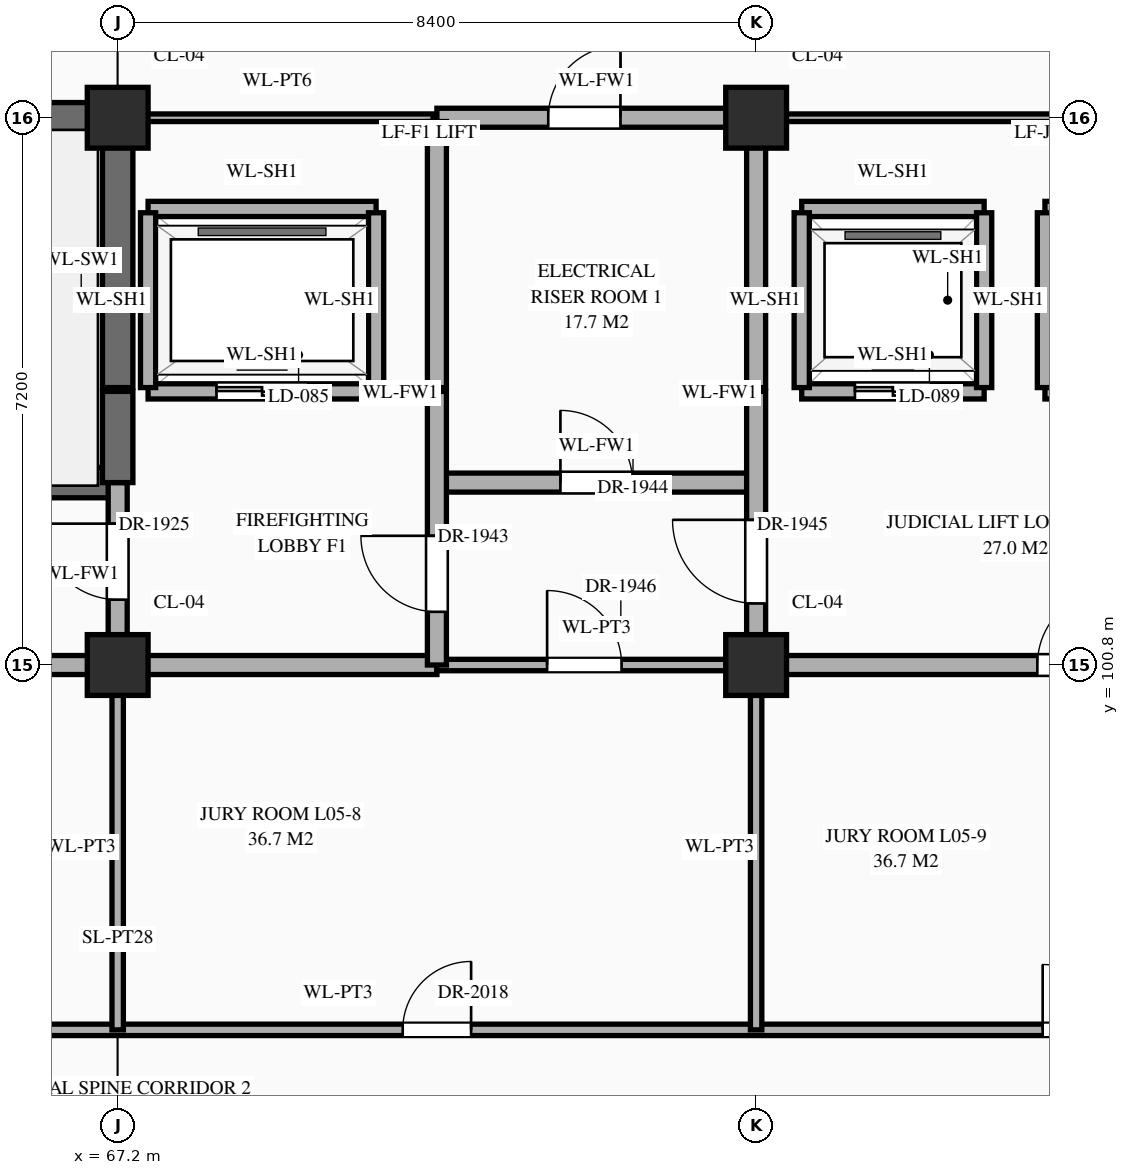
"""IFC4 building model, lengths in metres.
Left out: names, types, materials, properties, quantities, classifications, styles, units other than length and angle.
Written with IfcOpenShell. Run it as: python <this file> out.ifc"""

import sys

from ifc_helpers import new_model, si_unit, direction, frame, frame_2d, origin, origin_2d, place, context, subcontext, project, spatial, rectangle, extrude, element, fill, save


model = new_model("IFC4")
c1 = context("Model", 3, precision=1e-05, world=origin(), true_north=direction((0.0, 1.0)))
c2 = subcontext(c1, "Body", "Model", "MODEL_VIEW")
j1 = project(units=[si_unit("LENGTHUNIT", "METRE"), si_unit("PLANEANGLEUNIT", "RADIAN")], contexts=[c1])
p1 = place(None, origin())
s1 = spatial("IfcSite", under=j1, at=p1, CompositionType="ELEMENT")
p2 = place(p1, origin())
s2 = spatial("IfcBuilding", under=s1, at=p2, CompositionType="ELEMENT")
p3 = place(p2, frame((0.0, 0.0, 21.6)))
s3 = spatial("IfcBuildingStorey", under=s2, at=p3, CompositionType="ELEMENT", Elevation=21.6)
for number, where, z_axis, x_axis in (
    (1, (67.2, 100.8, 0.0), (0.0, 0.0, 1.0), (1.0, 0.0, 0.0)),
    (2, (67.2, 108.0, 0.0), (0.0, 0.0, 1.0), (1.0, 0.0, 0.0)),
    (3, (75.6, 100.8, 0.0), (0.0, 0.0, 1.0), (1.0, 0.0, 0.0)),
    (4, (75.6, 108.0, 0.0), (0.0, 0.0, 1.0), (1.0, 0.0, 0.0)),
):
    element("IfcColumn", number, at=place(p3, frame(where, z_axis=z_axis, x_axis=x_axis)), inside=s3, PredefinedType="COLUMN", context=c2, shape_type="SweptSolid", body=[
        extrude(rectangle(XDim=0.8, YDim=0.8, at=origin_2d()), origin(), (0.0, 0.0, 1.0), 4.5),
    ])
p4 = place(p3, frame((56.2, 96.0, 0.0), z_axis=(0.0, 0.0, 1.0), x_axis=(1.0, 0.0, 0.0)))
e5 = element("IfcWall", 5, at=p4, inside=s3, PredefinedType="STANDARD", context=c2, shape_type="SweptSolid", body=[
    extrude(rectangle(XDim=27.8, YDim=0.15, at=frame_2d((13.9, 0.0))), origin(), (0.0, 0.0, 1.0), 4.24),
])
p5 = place(p4, frame((0.77, 0.0, 0.0)))
e6 = element("IfcOpeningElement", 6, at=p5, cuts=e5, PredefinedType="OPENING", context=c2, shape_type="SweptSolid", body=[
    extrude(rectangle(XDim=1.06, YDim=2.4, at=frame_2d((0.53, 1.2))), frame((0.0, 0.087, 0.0), z_axis=(0.0, -1.0, 0.0), x_axis=(1.0, 0.0, 0.0)), (0.0, 0.0, 1.0), 0.174),
])
p6 = place(p4, frame((6.23, 0.0, 0.0)))
e7 = element("IfcOpeningElement", 7, at=p6, cuts=e5, PredefinedType="OPENING", context=c2, shape_type="SweptSolid", body=[
    extrude(rectangle(XDim=1.14, YDim=2.4, at=frame_2d((0.57, 1.2))), frame((0.0, 0.087, 0.0), z_axis=(0.0, -1.0, 0.0), x_axis=(1.0, 0.0, 0.0)), (0.0, 0.0, 1.0), 0.174),
])
p7 = place(p4, frame((14.75, 0.0, 0.0)))
e8 = element("IfcOpeningElement", 8, at=p7, cuts=e5, PredefinedType="OPENING", context=c2, shape_type="SweptSolid", body=[
    extrude(rectangle(XDim=0.9, YDim=2.15, at=frame_2d((0.45, 1.075))), frame((0.0, 0.087, 0.0), z_axis=(0.0, -1.0, 0.0), x_axis=(1.0, 0.0, 0.0)), (0.0, 0.0, 1.0), 0.174),
])
p8 = place(p4, frame((23.17, 0.0, 0.0)))
e9 = element("IfcOpeningElement", 9, at=p8, cuts=e5, PredefinedType="OPENING", context=c2, shape_type="SweptSolid", body=[
    extrude(rectangle(XDim=0.86, YDim=2.1, at=frame_2d((0.43, 1.05))), frame((0.0, 0.087, 0.0), z_axis=(0.0, -1.0, 0.0), x_axis=(1.0, 0.0, 0.0)), (0.0, 0.0, 1.0), 0.174),
])
p9 = place(p3, frame((58.8, 100.8, 0.0), z_axis=(0.0, 0.0, 1.0), x_axis=(1.0, 0.0, 0.0)))
e10 = element("IfcWall", 10, at=p9, inside=s3, PredefinedType="STANDARD", context=c2, shape_type="SweptSolid", body=[
    extrude(rectangle(XDim=12.6, YDim=0.25, at=frame_2d((6.3, 0.0))), origin(), (0.0, 0.0, 1.0), 3.39),
])
p10 = place(p9, frame((3.65, 0.0, 0.0)))
e11 = element("IfcOpeningElement", 11, at=p10, cuts=e10, PredefinedType="OPENING", context=c2, shape_type="SweptSolid", body=[
    extrude(rectangle(XDim=1.1, YDim=2.2, at=frame_2d((0.55, 1.1))), frame((0.0, 0.137, 0.0), z_axis=(0.0, -1.0, 0.0), x_axis=(1.0, 0.0, 0.0)), (0.0, 0.0, 1.0), 0.274),
])
p11 = place(p3, frame((71.4, 100.8, 0.0), z_axis=(0.0, 0.0, 1.0), x_axis=(1.0, 0.0, 0.0)))
e12 = element("IfcWall", 12, at=p11, inside=s3, PredefinedType="STANDARD", context=c2, shape_type="SweptSolid", body=[
    extrude(rectangle(XDim=4.2, YDim=0.15, at=frame_2d((2.1, 0.0))), origin(), (0.0, 0.0, 1.0), 3.39),
])
p12 = place(p11, frame((1.45, 0.0, 0.0)))
e13 = element("IfcOpeningElement", 13, at=p12, cuts=e12, PredefinedType="OPENING", context=c2, shape_type="SweptSolid", body=[
    extrude(rectangle(XDim=0.98, YDim=2.35, at=frame_2d((0.49, 1.175))), frame((0.0, 0.087, 0.0), z_axis=(0.0, -1.0, 0.0), x_axis=(1.0, 0.0, 0.0)), (0.0, 0.0, 1.0), 0.174),
])
p13 = place(p3, frame((75.6, 100.8, 0.0), z_axis=(0.0, 0.0, 1.0), x_axis=(1.0, 0.0, 0.0)))
e14 = element("IfcWall", 14, at=p13, inside=s3, PredefinedType="STANDARD", context=c2, shape_type="SweptSolid", body=[
    extrude(rectangle(XDim=16.8, YDim=0.25, at=frame_2d((8.4, 0.0))), origin(), (0.0, 0.0, 1.0), 3.39),
])
p14 = place(p13, frame((3.7, 0.0, 0.0)))
e15 = element("IfcOpeningElement", 15, at=p14, cuts=e14, PredefinedType="OPENING", context=c2, shape_type="SweptSolid", body=[
    extrude(rectangle(XDim=1.0, YDim=2.2, at=frame_2d((0.5, 1.1))), frame((0.0, 0.137, 0.0), z_axis=(0.0, -1.0, 0.0), x_axis=(1.0, 0.0, 0.0)), (0.0, 0.0, 1.0), 0.274),
])
p15 = place(p13, frame((9.71, 0.0, 0.0)))
e16 = element("IfcOpeningElement", 16, at=p15, cuts=e14, PredefinedType="OPENING", context=c2, shape_type="SweptSolid", body=[
    extrude(rectangle(XDim=1.1, YDim=2.2, at=frame_2d((0.55, 1.1))), frame((0.0, 0.137, 0.0), z_axis=(0.0, -1.0, 0.0), x_axis=(1.0, 0.0, 0.0)), (0.0, 0.0, 1.0), 0.274),
])
p16 = place(p13, frame((12.5, 0.0, 0.0)))
e17 = element("IfcOpeningElement", 17, at=p16, cuts=e14, PredefinedType="OPENING", context=c2, shape_type="SweptSolid", body=[
    extrude(rectangle(XDim=1.0, YDim=2.2, at=frame_2d((0.5, 1.1))), frame((0.0, 0.137, 0.0), z_axis=(0.0, -1.0, 0.0), x_axis=(1.0, 0.0, 0.0)), (0.0, 0.0, 1.0), 0.274),
])
p17 = place(p13, frame((14.865, 0.0, 0.0)))
e18 = element("IfcOpeningElement", 18, at=p17, cuts=e14, PredefinedType="OPENING", context=c2, shape_type="SweptSolid", body=[
    extrude(rectangle(XDim=0.95, YDim=2.15, at=frame_2d((0.475, 1.075))), frame((0.0, 0.137, 0.0), z_axis=(0.0, -1.0, 0.0), x_axis=(1.0, 0.0, 0.0)), (0.0, 0.0, 1.0), 0.274),
])
p18 = place(p3, frame((58.8, 103.2, 0.0), z_axis=(0.0, 0.0, 1.0), x_axis=(1.0, 0.0, 0.0)))
e19 = element("IfcWall", 19, at=p18, inside=s3, PredefinedType="SHEAR", context=c2, shape_type="SweptSolid", body=[
    extrude(rectangle(XDim=8.4, YDim=0.4, at=frame_2d((4.2, 0.0))), origin(), (0.0, 0.0, 1.0), 4.24),
])
p19 = place(p18, frame((0.65, 0.0, 0.0)))
e20 = element("IfcOpeningElement", 20, at=p19, cuts=e19, PredefinedType="OPENING", context=c2, shape_type="SweptSolid", body=[
    extrude(rectangle(XDim=1.1, YDim=2.2, at=frame_2d((0.55, 1.1))), frame((0.0, 0.212, 0.0), z_axis=(0.0, -1.0, 0.0), x_axis=(1.0, 0.0, 0.0)), (0.0, 0.0, 1.0), 0.424),
])
p20 = place(p3, frame((71.4, 103.2, 0.0), z_axis=(0.0, 0.0, 1.0), x_axis=(1.0, 0.0, 0.0)))
e21 = element("IfcWall", 21, at=p20, inside=s3, PredefinedType="STANDARD", context=c2, shape_type="SweptSolid", body=[
    extrude(rectangle(XDim=4.2, YDim=0.25, at=frame_2d((2.1, 0.0))), origin(), (0.0, 0.0, 1.0), 4.24),
])
p21 = place(p20, frame((1.625, 0.0, 0.0)))
e22 = element("IfcOpeningElement", 22, at=p21, cuts=e21, PredefinedType="OPENING", context=c2, shape_type="SweptSolid", body=[
    extrude(rectangle(XDim=0.95, YDim=2.15, at=frame_2d((0.475, 1.075))), frame((0.0, 0.137, 0.0), z_axis=(0.0, -1.0, 0.0), x_axis=(1.0, 0.0, 0.0)), (0.0, 0.0, 1.0), 0.274),
])
p22 = place(p3, frame((67.6, 104.4, 0.0), z_axis=(0.0, 0.0, 1.0), x_axis=(1.0, 0.0, 0.0)))
e23 = element("IfcWall", 23, at=p22, inside=s3, PredefinedType="STANDARD", context=c2, shape_type="SweptSolid", body=[
    extrude(rectangle(XDim=3.0, YDim=0.2, at=frame_2d((1.5, 0.0))), origin(), (0.0, 0.0, 1.0), 4.24),
])
p23 = place(p22, frame((0.9, 0.0, 0.0)))
e24 = element("IfcOpeningElement", 24, at=p23, cuts=e23, PredefinedType="OPENING", context=c2, shape_type="SweptSolid", body=[
    extrude(rectangle(XDim=1.2, YDim=2.15, at=frame_2d((0.6, 1.075))), frame((0.0, 0.112, 0.0), z_axis=(0.0, -1.0, 0.0), x_axis=(1.0, 0.0, 0.0)), (0.0, 0.0, 1.0), 0.224),
])
p24 = place(p3, frame((76.2, 104.4, 0.0), z_axis=(0.0, 0.0, 1.0), x_axis=(1.0, 0.0, 0.0)))
e25 = element("IfcWall", 25, at=p24, inside=s3, PredefinedType="STANDARD", context=c2, shape_type="SweptSolid", body=[
    extrude(rectangle(XDim=2.4, YDim=0.2, at=frame_2d((1.2, 0.0))), origin(), (0.0, 0.0, 1.0), 4.24),
])
p25 = place(p24, frame((0.7, 0.0, 0.0)))
e26 = element("IfcOpeningElement", 26, at=p25, cuts=e25, PredefinedType="OPENING", context=c2, shape_type="SweptSolid", body=[
    extrude(rectangle(XDim=1.0, YDim=2.15, at=frame_2d((0.5, 1.075))), frame((0.0, 0.112, 0.0), z_axis=(0.0, -1.0, 0.0), x_axis=(1.0, 0.0, 0.0)), (0.0, 0.0, 1.0), 0.224),
])
p26 = place(p3, frame((79.4, 104.4, 0.0), z_axis=(0.0, 0.0, 1.0), x_axis=(1.0, 0.0, 0.0)))
e27 = element("IfcWall", 27, at=p26, inside=s3, PredefinedType="STANDARD", context=c2, shape_type="SweptSolid", body=[
    extrude(rectangle(XDim=2.4, YDim=0.2, at=frame_2d((1.2, 0.0))), origin(), (0.0, 0.0, 1.0), 4.24),
])
p27 = place(p26, frame((0.7, 0.0, 0.0)))
e28 = element("IfcOpeningElement", 28, at=p27, cuts=e27, PredefinedType="OPENING", context=c2, shape_type="SweptSolid", body=[
    extrude(rectangle(XDim=1.0, YDim=2.15, at=frame_2d((0.5, 1.075))), frame((0.0, 0.112, 0.0), z_axis=(0.0, -1.0, 0.0), x_axis=(1.0, 0.0, 0.0)), (0.0, 0.0, 1.0), 0.224),
])
p28 = place(p3, frame((67.6, 106.8, 0.0), z_axis=(0.0, 0.0, 1.0), x_axis=(1.0, 0.0, 0.0)))
e29 = element("IfcWall", 29, at=p28, inside=s3, PredefinedType="STANDARD", context=c2, shape_type="SweptSolid", body=[
    extrude(rectangle(XDim=3.0, YDim=0.2, at=frame_2d((1.5, 0.0))), origin(), (0.0, 0.0, 1.0), 4.24),
])
for number, where, z_axis, x_axis in (
    (30, (76.2, 106.8, 0.0), (0.0, 0.0, 1.0), (1.0, 0.0, 0.0)),
    (31, (79.4, 106.8, 0.0), (0.0, 0.0, 1.0), (1.0, 0.0, 0.0)),
):
    element("IfcWall", number, at=place(p3, frame(where, z_axis=z_axis, x_axis=x_axis)), inside=s3, PredefinedType="STANDARD", context=c2, shape_type="SweptSolid", body=[
        extrude(rectangle(XDim=2.4, YDim=0.2, at=frame_2d((1.2, 0.0))), origin(), (0.0, 0.0, 1.0), 4.24),
    ])
p29 = place(p3, frame((58.8, 108.0, 0.0), z_axis=(0.0, 0.0, 1.0), x_axis=(1.0, 0.0, 0.0)))
e32 = element("IfcWall", 32, at=p29, inside=s3, PredefinedType="SHEAR", context=c2, shape_type="SweptSolid", body=[
    extrude(rectangle(XDim=8.4, YDim=0.4, at=frame_2d((4.2, 0.0))), origin(), (0.0, 0.0, 1.0), 4.24),
])
p30 = place(p3, frame((67.25, 108.0, 0.0), z_axis=(0.0, 0.0, 1.0), x_axis=(1.0, 0.0, 0.0)))
e33 = element("IfcWall", 33, at=p30, inside=s3, PredefinedType="STANDARD", context=c2, shape_type="SweptSolid", body=[
    extrude(rectangle(XDim=4.1, YDim=0.1, at=frame_2d((2.05, 0.0))), origin(), (0.0, 0.0, 1.0), 3.39),
])
p31 = place(p3, frame((71.4, 108.0, 0.0), z_axis=(0.0, 0.0, 1.0), x_axis=(1.0, 0.0, 0.0)))
e34 = element("IfcWall", 34, at=p31, inside=s3, PredefinedType="STANDARD", context=c2, shape_type="SweptSolid", body=[
    extrude(rectangle(XDim=4.2, YDim=0.25, at=frame_2d((2.1, 0.0))), origin(), (0.0, 0.0, 1.0), 3.39),
])
p32 = place(p31, frame((1.465, 0.0, 0.0)))
e35 = element("IfcOpeningElement", 35, at=p32, cuts=e34, PredefinedType="OPENING", context=c2, shape_type="SweptSolid", body=[
    extrude(rectangle(XDim=0.95, YDim=2.15, at=frame_2d((0.475, 1.075))), frame((0.0, 0.137, 0.0), z_axis=(0.0, -1.0, 0.0), x_axis=(1.0, 0.0, 0.0)), (0.0, 0.0, 1.0), 0.274),
])
p33 = place(p3, frame((75.65, 108.0, 0.0), z_axis=(0.0, 0.0, 1.0), x_axis=(1.0, 0.0, 0.0)))
e36 = element("IfcWall", 36, at=p33, inside=s3, PredefinedType="STANDARD", context=c2, shape_type="SweptSolid", body=[
    extrude(rectangle(XDim=6.15, YDim=0.1, at=frame_2d((3.075, 0.0))), origin(), (0.0, 0.0, 1.0), 3.39),
])
p34 = place(p3, frame((67.2, 96.0, 0.0), z_axis=(0.0, 0.0, 1.0), x_axis=(0.0, 1.0, 0.0)))
e37 = element("IfcWall", 37, at=p34, inside=s3, PredefinedType="STANDARD", context=c2, shape_type="SweptSolid", body=[
    extrude(rectangle(XDim=4.8, YDim=0.15, at=frame_2d((2.4, 0.0))), origin(), (0.0, 0.0, 1.0), 3.49),
])
p35 = place(p3, frame((67.2, 100.8, 0.0), z_axis=(0.0, 0.0, 1.0), x_axis=(0.0, 1.0, 0.0)))
e38 = element("IfcWall", 38, at=p35, inside=s3, PredefinedType="STANDARD", context=c2, shape_type="SweptSolid", body=[
    extrude(rectangle(XDim=2.4, YDim=0.25, at=frame_2d((1.2, 0.0))), origin(), (0.0, 0.0, 1.0), 3.49),
])
p36 = place(p35, frame((0.86, 0.0, 0.0)))
e39 = element("IfcOpeningElement", 39, at=p36, cuts=e38, PredefinedType="OPENING", context=c2, shape_type="SweptSolid", body=[
    extrude(rectangle(XDim=1.0, YDim=2.2, at=frame_2d((0.5, 1.1))), frame((0.0, 0.137, 0.0), z_axis=(0.0, -1.0, 0.0), x_axis=(1.0, 0.0, 0.0)), (0.0, 0.0, 1.0), 0.274),
])
p37 = place(p3, frame((67.2, 103.2, 0.0), z_axis=(0.0, 0.0, 1.0), x_axis=(0.0, 1.0, 0.0)))
e40 = element("IfcWall", 40, at=p37, inside=s3, PredefinedType="SHEAR", context=c2, shape_type="SweptSolid", body=[
    extrude(rectangle(XDim=1.2, YDim=0.4, at=frame_2d((0.6, 0.0))), origin(), (0.0, 0.0, 1.0), 4.24),
])
p38 = place(p3, frame((67.2, 104.45, 0.0), z_axis=(0.0, 0.0, 1.0), x_axis=(0.0, 1.0, 0.0)))
e41 = element("IfcWall", 41, at=p38, inside=s3, PredefinedType="SHEAR", context=c2, shape_type="SweptSolid", body=[
    extrude(rectangle(XDim=3.5, YDim=0.4, at=frame_2d((1.75, 0.0))), origin(), (0.0, 0.0, 1.0), 4.24),
])
for number, where, z_axis, x_axis in (
    (42, (67.6, 104.45, 0.0), (0.0, 0.0, 1.0), (0.0, 1.0, 0.0)),
    (43, (70.6, 104.45, 0.0), (0.0, 0.0, 1.0), (0.0, 1.0, 0.0)),
):
    element("IfcWall", number, at=place(p3, frame(where, z_axis=z_axis, x_axis=x_axis)), inside=s3, PredefinedType="STANDARD", context=c2, shape_type="SweptSolid", body=[
        extrude(rectangle(XDim=2.3, YDim=0.2, at=frame_2d((1.15, 0.0))), origin(), (0.0, 0.0, 1.0), 4.24),
    ])
p39 = place(p3, frame((71.4, 100.8, 0.0), z_axis=(0.0, 0.0, 1.0), x_axis=(0.0, 1.0, 0.0)))
e44 = element("IfcWall", 44, at=p39, inside=s3, PredefinedType="STANDARD", context=c2, shape_type="SweptSolid", body=[
    extrude(rectangle(XDim=3.6, YDim=0.25, at=frame_2d((1.8, 0.0))), origin(), (0.0, 0.0, 1.0), 3.89),
])
p40 = place(p39, frame((0.7, 0.0, 0.0)))
e45 = element("IfcOpeningElement", 45, at=p40, cuts=e44, PredefinedType="OPENING", context=c2, shape_type="SweptSolid", body=[
    extrude(rectangle(XDim=1.0, YDim=2.2, at=frame_2d((0.5, 1.1))), frame((0.0, 0.137, 0.0), z_axis=(0.0, -1.0, 0.0), x_axis=(1.0, 0.0, 0.0)), (0.0, 0.0, 1.0), 0.274),
])
p41 = place(p3, frame((71.4, 104.45, 0.0), z_axis=(0.0, 0.0, 1.0), x_axis=(0.0, 1.0, 0.0)))
e46 = element("IfcWall", 46, at=p41, inside=s3, PredefinedType="STANDARD", context=c2, shape_type="SweptSolid", body=[
    extrude(rectangle(XDim=3.5, YDim=0.25, at=frame_2d((1.75, 0.0))), origin(), (0.0, 0.0, 1.0), 3.89),
])
p42 = place(p3, frame((75.6, 96.0, 0.0), z_axis=(0.0, 0.0, 1.0), x_axis=(0.0, 1.0, 0.0)))
e47 = element("IfcWall", 47, at=p42, inside=s3, PredefinedType="STANDARD", context=c2, shape_type="SweptSolid", body=[
    extrude(rectangle(XDim=4.8, YDim=0.15, at=frame_2d((2.4, 0.0))), origin(), (0.0, 0.0, 1.0), 3.49),
])
p43 = place(p3, frame((75.6, 100.8, 0.0), z_axis=(0.0, 0.0, 1.0), x_axis=(0.0, 1.0, 0.0)))
e48 = element("IfcWall", 48, at=p43, inside=s3, PredefinedType="STANDARD", context=c2, shape_type="SweptSolid", body=[
    extrude(rectangle(XDim=3.6, YDim=0.25, at=frame_2d((1.8, 0.0))), origin(), (0.0, 0.0, 1.0), 3.49),
])
p44 = place(p43, frame((0.81, 0.0, 0.0)))
e49 = element("IfcOpeningElement", 49, at=p44, cuts=e48, PredefinedType="OPENING", context=c2, shape_type="SweptSolid", body=[
    extrude(rectangle(XDim=1.1, YDim=2.2, at=frame_2d((0.55, 1.1))), frame((0.0, 0.137, 0.0), z_axis=(0.0, -1.0, 0.0), x_axis=(1.0, 0.0, 0.0)), (0.0, 0.0, 1.0), 0.274),
])
p45 = place(p3, frame((75.6, 104.45, 0.0), z_axis=(0.0, 0.0, 1.0), x_axis=(0.0, 1.0, 0.0)))
e50 = element("IfcWall", 50, at=p45, inside=s3, PredefinedType="STANDARD", context=c2, shape_type="SweptSolid", body=[
    extrude(rectangle(XDim=3.5, YDim=0.25, at=frame_2d((1.75, 0.0))), origin(), (0.0, 0.0, 1.0), 3.49),
])
for number, where, z_axis, x_axis in (
    (51, (76.2, 104.45, 0.0), (0.0, 0.0, 1.0), (0.0, 1.0, 0.0)),
    (52, (78.6, 104.45, 0.0), (0.0, 0.0, 1.0), (0.0, 1.0, 0.0)),
    (53, (79.4, 104.45, 0.0), (0.0, 0.0, 1.0), (0.0, 1.0, 0.0)),
):
    element("IfcWall", number, at=place(p3, frame(where, z_axis=z_axis, x_axis=x_axis)), inside=s3, PredefinedType="STANDARD", context=c2, shape_type="SweptSolid", body=[
        extrude(rectangle(XDim=2.3, YDim=0.2, at=frame_2d((1.15, 0.0))), origin(), (0.0, 0.0, 1.0), 4.24),
    ])
p46 = place(p23, origin())
e54 = element("IfcDoor", 54, at=p46, inside=s3, OperationType="DOUBLE_DOOR_SLIDING", PredefinedType="DOOR", context=c2, shape_type="SweptSolid", body=[
    extrude(rectangle(XDim=1.2, YDim=2.15, at=frame_2d((0.6, 1.075))), frame((0.0, 0.025, 0.0), z_axis=(0.0, -1.0, 0.0), x_axis=(1.0, 0.0, 0.0)), (0.0, 0.0, 1.0), 0.05),
])
fill(e24, e54)
p47 = place(p25, origin())
e55 = element("IfcDoor", 55, at=p47, inside=s3, OperationType="DOUBLE_DOOR_SLIDING", PredefinedType="DOOR", context=c2, shape_type="SweptSolid", body=[
    extrude(rectangle(XDim=1.0, YDim=2.15, at=frame_2d((0.5, 1.075))), frame((0.0, 0.025, 0.0), z_axis=(0.0, -1.0, 0.0), x_axis=(1.0, 0.0, 0.0)), (0.0, 0.0, 1.0), 0.05),
])
fill(e26, e55)
p48 = place(p36, origin())
e56 = element("IfcDoor", 56, at=p48, inside=s3, OperationType="SINGLE_SWING_RIGHT", PredefinedType="DOOR", context=c2, shape_type="SweptSolid", body=[
    extrude(rectangle(XDim=1.0, YDim=2.2, at=frame_2d((0.5, 1.1))), frame((0.0, 0.025, 0.0), z_axis=(0.0, -1.0, 0.0), x_axis=(1.0, 0.0, 0.0)), (0.0, 0.0, 1.0), 0.05),
])
fill(e39, e56)
p49 = place(p40, origin())
e57 = element("IfcDoor", 57, at=p49, inside=s3, OperationType="SINGLE_SWING_RIGHT", PredefinedType="DOOR", context=c2, shape_type="SweptSolid", body=[
    extrude(rectangle(XDim=1.0, YDim=2.2, at=frame_2d((0.5, 1.1))), frame((0.0, 0.025, 0.0), z_axis=(0.0, -1.0, 0.0), x_axis=(1.0, 0.0, 0.0)), (0.0, 0.0, 1.0), 0.05),
])
fill(e45, e57)
p50 = place(p21, origin())
e58 = element("IfcDoor", 58, at=p50, inside=s3, OperationType="SINGLE_SWING_LEFT", PredefinedType="DOOR", context=c2, shape_type="SweptSolid", body=[
    extrude(rectangle(XDim=0.95, YDim=2.15, at=frame_2d((0.475, 1.075))), frame((0.0, 0.025, 0.0), z_axis=(0.0, -1.0, 0.0), x_axis=(1.0, 0.0, 0.0)), (0.0, 0.0, 1.0), 0.05),
])
fill(e22, e58)
p51 = place(p44, origin())
e59 = element("IfcDoor", 59, at=p51, inside=s3, OperationType="SINGLE_SWING_RIGHT", PredefinedType="DOOR", context=c2, shape_type="SweptSolid", body=[
    extrude(rectangle(XDim=1.1, YDim=2.2, at=frame_2d((0.55, 1.1))), frame((0.0, 0.025, 0.0), z_axis=(0.0, -1.0, 0.0), x_axis=(1.0, 0.0, 0.0)), (0.0, 0.0, 1.0), 0.05),
])
fill(e49, e59)
p52 = place(p12, origin())
e60 = element("IfcDoor", 60, at=p52, inside=s3, OperationType="SINGLE_SWING_LEFT", PredefinedType="DOOR", context=c2, shape_type="SweptSolid", body=[
    extrude(rectangle(XDim=0.98, YDim=2.35, at=frame_2d((0.49, 1.175))), frame((0.0, 0.025, 0.0), z_axis=(0.0, -1.0, 0.0), x_axis=(1.0, 0.0, 0.0)), (0.0, 0.0, 1.0), 0.05),
])
fill(e13, e60)
p53 = place(p32, origin())
e61 = element("IfcDoor", 61, at=p53, inside=s3, OperationType="SINGLE_SWING_RIGHT", PredefinedType="DOOR", context=c2, shape_type="SweptSolid", body=[
    extrude(rectangle(XDim=0.95, YDim=2.15, at=frame_2d((0.475, 1.075))), frame((0.0, 0.025, 0.0), z_axis=(0.0, -1.0, 0.0), x_axis=(1.0, 0.0, 0.0)), (0.0, 0.0, 1.0), 0.05),
])
fill(e35, e61)
p54 = place(p14, origin())
e62 = element("IfcDoor", 62, at=p54, inside=s3, OperationType="SINGLE_SWING_RIGHT", PredefinedType="DOOR", context=c2, shape_type="SweptSolid", body=[
    extrude(rectangle(XDim=1.0, YDim=2.2, at=frame_2d((0.5, 1.1))), frame((0.0, 0.025, 0.0), z_axis=(0.0, -1.0, 0.0), x_axis=(1.0, 0.0, 0.0)), (0.0, 0.0, 1.0), 0.05),
])
fill(e15, e62)
p55 = place(p7, origin())
e63 = element("IfcDoor", 63, at=p55, inside=s3, OperationType="SINGLE_SWING_RIGHT", PredefinedType="DOOR", context=c2, shape_type="SweptSolid", body=[
    extrude(rectangle(XDim=0.9, YDim=2.15, at=frame_2d((0.45, 1.075))), frame((0.0, 0.025, 0.0), z_axis=(0.0, -1.0, 0.0), x_axis=(1.0, 0.0, 0.0)), (0.0, 0.0, 1.0), 0.05),
])
fill(e8, e63)
p56 = place(p8, origin())
e64 = element("IfcDoor", 64, at=p56, inside=s3, OperationType="SINGLE_SWING_LEFT", PredefinedType="DOOR", context=c2, shape_type="SweptSolid", body=[
    extrude(rectangle(XDim=0.86, YDim=2.1, at=frame_2d((0.43, 1.05))), frame((0.0, 0.025, 0.0), z_axis=(0.0, -1.0, 0.0), x_axis=(1.0, 0.0, 0.0)), (0.0, 0.0, 1.0), 0.05),
])
fill(e9, e64)
save(model, sys.argv[1])
